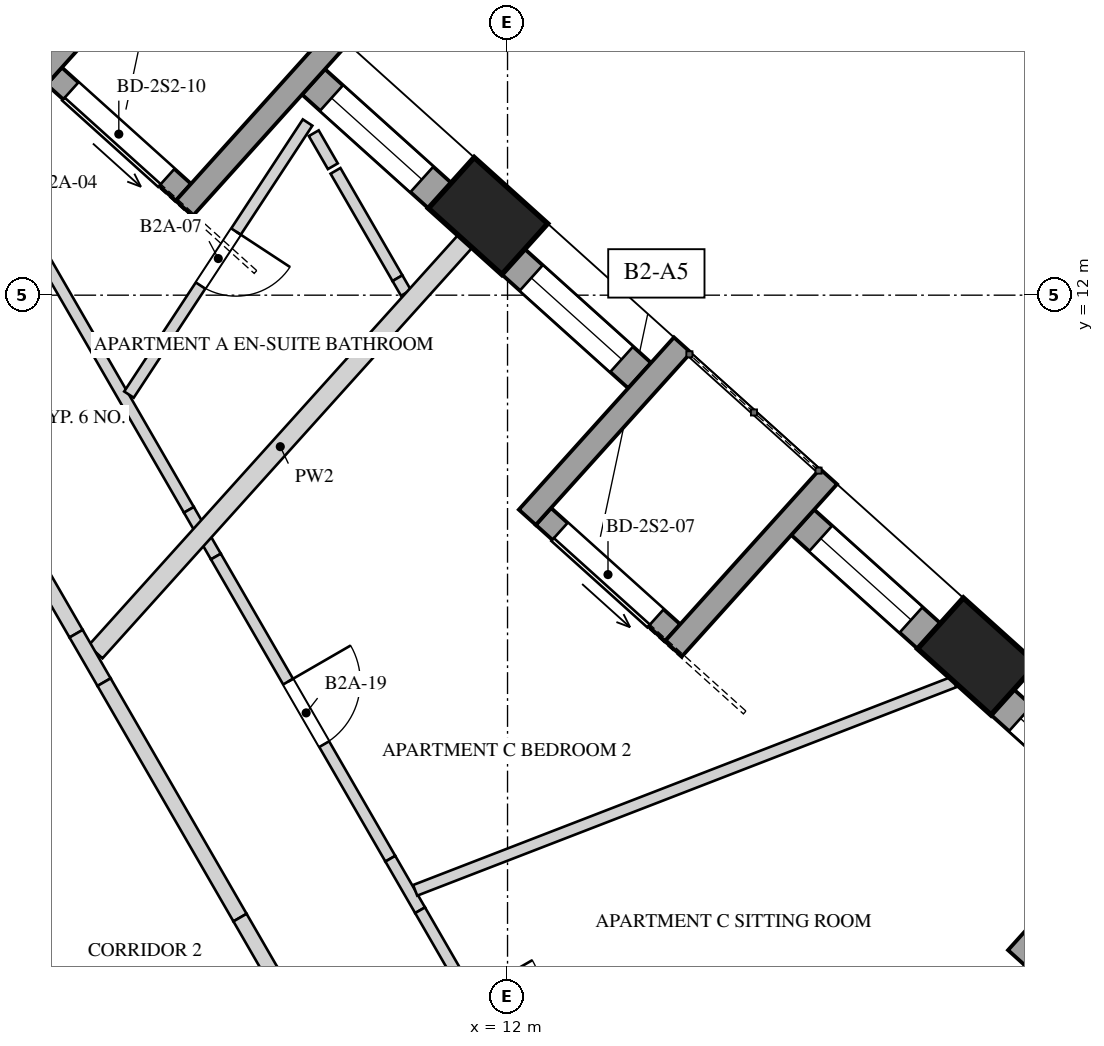
"""IFC4 building model, lengths in metres.
Left out: names, types, materials, properties, quantities, classifications, styles, units other than length and angle.
Written with IfcOpenShell. Run it as: python <this file> out.ifc"""

import sys

from ifc_helpers import new_model, si_unit, direction, frame, frame_2d, origin, origin_2d, place, context, subcontext, project, spatial, rectangle, extrude, element, fill, save


model = new_model("IFC4")
c1 = context("Model", 3, precision=1e-05, world=origin(), true_north=direction((0.0, 1.0)))
c2 = subcontext(c1, "Body", "Model", "MODEL_VIEW")
j1 = project(units=[si_unit("LENGTHUNIT", "METRE"), si_unit("PLANEANGLEUNIT", "RADIAN")], contexts=[c1])
p1 = place(None, origin())
s1 = spatial("IfcSite", under=j1, at=p1, CompositionType="ELEMENT")
p2 = place(p1, origin())
s2 = spatial("IfcBuilding", under=s1, at=p2, CompositionType="ELEMENT")
p3 = place(p2, frame((0.0, 0.0, 88.4)))
s3 = spatial("IfcBuildingStorey", under=s2, at=p3, CompositionType="ELEMENT", Elevation=88.4)
p4 = place(p3, frame((9.699, -4.25, 0.0), z_axis=(0.0, 0.0, 1.0), x_axis=(-0.499999102847, 0.866025921755, 0.0)))
e1 = element("IfcWall", 1, at=p4, inside=s3, PredefinedType="SHEAR", context=c2, shape_type="SweptSolid", body=[
    extrude(rectangle(XDim=17.061, YDim=0.95, at=frame_2d((8.53, 0.0))), origin(), (0.0, 0.0, 1.0), 4.0),
])
p5 = place(p4, frame((6.805, 0.0, 0.0)))
e2 = element("IfcOpeningElement", 2, at=p5, cuts=e1, PredefinedType="OPENING", context=c2, shape_type="SweptSolid", body=[
    extrude(rectangle(XDim=1.0, YDim=2.4, at=frame_2d((0.5, 1.2))), frame((0.0, 0.485, 0.0), z_axis=(0.0, -1.0, 0.0), x_axis=(1.0, 0.0, 0.0)), (0.0, 0.0, 1.0), 0.97),
])
for number, where, z_axis, x_axis in (
    (3, (18.179, 7.247, -0.35), (0.0, 0.0, 1.0), (-0.743, 0.669, 0.0)),
    (4, (11.743, 13.042, -0.35), (0.0, 0.0, 1.0), (-0.743, 0.669, 0.0)),
):
    element("IfcColumn", number, at=place(p3, frame(where, z_axis=z_axis, x_axis=x_axis)), inside=s3, PredefinedType="COLUMN", context=c2, shape_type="SweptSolid", body=[
        extrude(rectangle(XDim=1.3, YDim=0.9, at=origin_2d()), origin(), (0.0, 0.0, 1.0), 4.35),
    ])
p6 = place(p3, frame((20.174, 5.148, 0.0), z_axis=(0.0, 0.0, 1.0), x_axis=(-0.743136746477, 0.669139578889, 0.0)))
e5 = element("IfcWall", 5, at=p6, inside=s3, PredefinedType="SOLIDWALL", context=c2, shape_type="SweptSolid", body=[
    extrude(rectangle(XDim=2.237, YDim=0.45, at=frame_2d((1.119, 0.0))), origin(), (0.0, 0.0, 1.0), 3.3),
])
p7 = place(p6, frame((0.318, 0.0, 0.7)))
e6 = element("IfcOpeningElement", 6, at=p7, cuts=e5, PredefinedType="OPENING", context=c2, shape_type="SweptSolid", body=[
    extrude(rectangle(XDim=1.6, YDim=2.3, at=frame_2d((0.8, 1.15))), frame((0.0, 0.235, 0.0), z_axis=(0.0, -1.0, 0.0), x_axis=(1.0, 0.0, 0.0)), (0.0, 0.0, 1.0), 0.47),
])
p8 = place(p3, frame((17.545, 7.515, 0.0), z_axis=(0.0, 0.0, 1.0), x_axis=(-0.743142151309, 0.669133576311, 0.0)))
e7 = element("IfcWall", 7, at=p8, inside=s3, PredefinedType="SOLIDWALL", context=c2, shape_type="SweptSolid", body=[
    extrude(rectangle(XDim=2.237, YDim=0.45, at=frame_2d((1.118, 0.0))), origin(), (0.0, 0.0, 1.0), 3.3),
])
p9 = place(p8, frame((0.318, 0.0, 0.7)))
e8 = element("IfcOpeningElement", 8, at=p9, cuts=e7, PredefinedType="OPENING", context=c2, shape_type="SweptSolid", body=[
    extrude(rectangle(XDim=1.6, YDim=2.3, at=frame_2d((0.8, 1.15))), frame((0.0, 0.235, 0.0), z_axis=(0.0, -1.0, 0.0), x_axis=(1.0, 0.0, 0.0)), (0.0, 0.0, 1.0), 0.47),
])
p10 = place(p3, frame((13.738, 10.943, 0.0), z_axis=(0.0, 0.0, 1.0), x_axis=(-0.743191019375, 0.669079299276, 0.0)))
e9 = element("IfcWall", 9, at=p10, inside=s3, PredefinedType="SOLIDWALL", context=c2, shape_type="SweptSolid", body=[
    extrude(rectangle(XDim=2.237, YDim=0.45, at=frame_2d((1.118, 0.0))), origin(), (0.0, 0.0, 1.0), 3.3),
])
p11 = place(p10, frame((0.318, 0.0, 0.7)))
e10 = element("IfcOpeningElement", 10, at=p11, cuts=e9, PredefinedType="OPENING", context=c2, shape_type="SweptSolid", body=[
    extrude(rectangle(XDim=1.6, YDim=2.3, at=frame_2d((0.8, 1.15))), frame((0.0, 0.235, 0.0), z_axis=(0.0, -1.0, 0.0), x_axis=(1.0, 0.0, 0.0)), (0.0, 0.0, 1.0), 0.47),
])
p12 = place(p3, frame((11.11, 13.31, 0.0), z_axis=(0.0, 0.0, 1.0), x_axis=(-0.743087873176, 0.669193852885, 0.0)))
e11 = element("IfcWall", 11, at=p12, inside=s3, PredefinedType="SOLIDWALL", context=c2, shape_type="SweptSolid", body=[
    extrude(rectangle(XDim=2.237, YDim=0.45, at=frame_2d((1.118, 0.0))), origin(), (0.0, 0.0, 1.0), 3.3),
])
p13 = place(p12, frame((0.318, 0.0, 0.7)))
e12 = element("IfcOpeningElement", 12, at=p13, cuts=e11, PredefinedType="OPENING", context=c2, shape_type="SweptSolid", body=[
    extrude(rectangle(XDim=1.6, YDim=2.3, at=frame_2d((0.8, 1.15))), frame((0.0, 0.235, 0.0), z_axis=(0.0, -1.0, 0.0), x_axis=(1.0, 0.0, 0.0)), (0.0, 0.0, 1.0), 0.47),
])
p14 = place(p3, frame((20.607, 1.764, 0.0), z_axis=(0.0, 0.0, 1.0), x_axis=(-0.743182653308, 0.669088591909, 0.0)))
e13 = element("IfcWall", 13, at=p14, inside=s3, PredefinedType="SOLIDWALL", context=c2, shape_type="SweptSolid", body=[
    extrude(rectangle(XDim=2.287, YDim=0.3, at=frame_2d((1.143, 0.0))), origin(), (0.0, 0.0, 1.0), 3.3),
])
p15 = place(p14, frame((0.293, 0.0, 0.0)))
e14 = element("IfcOpeningElement", 14, at=p15, cuts=e13, PredefinedType="OPENING", context=c2, shape_type="SweptSolid", body=[
    extrude(rectangle(XDim=1.7, YDim=2.4, at=frame_2d((0.85, 1.2))), frame((0.0, 0.16, 0.0), z_axis=(0.0, -1.0, 0.0), x_axis=(1.0, 0.0, 0.0)), (0.0, 0.0, 1.0), 0.32),
])
p16 = place(p3, frame((20.737, 5.55, 0.0), z_axis=(0.0, 0.0, 1.0), x_axis=(-0.669115082961, -0.743158802514, 0.0)))
e15 = element("IfcWall", 15, at=p16, inside=s3, PredefinedType="SOLIDWALL", context=c2, shape_type="SweptSolid", body=[
    extrude(rectangle(XDim=3.05, YDim=0.3, at=frame_2d((1.525, 0.0))), origin(), (0.0, 0.0, 1.0), 3.3),
])
p17 = place(p3, frame((14.171, 7.559, 0.0), z_axis=(0.0, 0.0, 1.0), x_axis=(-0.743134851659, 0.66914168324, 0.0)))
e16 = element("IfcWall", 16, at=p17, inside=s3, PredefinedType="SOLIDWALL", context=c2, shape_type="SweptSolid", body=[
    extrude(rectangle(XDim=2.287, YDim=0.3, at=frame_2d((1.143, 0.0))), origin(), (0.0, 0.0, 1.0), 3.3),
])
p18 = place(p17, frame((0.293, 0.0, 0.0)))
e17 = element("IfcOpeningElement", 17, at=p18, cuts=e16, PredefinedType="OPENING", context=c2, shape_type="SweptSolid", body=[
    extrude(rectangle(XDim=1.7, YDim=2.4, at=frame_2d((0.85, 1.2))), frame((0.0, 0.16, 0.0), z_axis=(0.0, -1.0, 0.0), x_axis=(1.0, 0.0, 0.0)), (0.0, 0.0, 1.0), 0.32),
])
for number, where, z_axis, x_axis in (
    (18, (16.223, 9.614, 0.0), (0.0, 0.0, 1.0), (-0.669, -0.743, 0.0)),
    (19, (14.301, 11.345, 0.0), (0.0, 0.0, 1.0), (-0.669, -0.743, 0.0)),
):
    element("IfcWall", number, at=place(p3, frame(where, z_axis=z_axis, x_axis=x_axis)), inside=s3, PredefinedType="SOLIDWALL", context=c2, shape_type="SweptSolid", body=[
        extrude(rectangle(XDim=3.05, YDim=0.3, at=frame_2d((1.525, 0.0))), origin(), (0.0, 0.0, 1.0), 3.3),
    ])
p19 = place(p3, frame((7.736, 13.354, 0.0), z_axis=(0.0, 0.0, 1.0), x_axis=(-0.743081759278, 0.669200641832, 0.0)))
e20 = element("IfcWall", 20, at=p19, inside=s3, PredefinedType="SOLIDWALL", context=c2, shape_type="SweptSolid", body=[
    extrude(rectangle(XDim=2.287, YDim=0.3, at=frame_2d((1.143, 0.0))), origin(), (0.0, 0.0, 1.0), 3.3),
])
p20 = place(p19, frame((0.293, 0.0, 0.0)))
e21 = element("IfcOpeningElement", 21, at=p20, cuts=e20, PredefinedType="OPENING", context=c2, shape_type="SweptSolid", body=[
    extrude(rectangle(XDim=1.7, YDim=2.4, at=frame_2d((0.85, 1.2))), frame((0.0, 0.16, 0.0), z_axis=(0.0, -1.0, 0.0), x_axis=(1.0, 0.0, 0.0)), (0.0, 0.0, 1.0), 0.32),
])
for number, where, z_axis, x_axis in (
    (22, (9.788, 15.409, 0.0), (0.0, 0.0, 1.0), (-0.669, -0.743, 0.0)),
    (23, (7.865, 17.139, 0.0), (0.0, 0.0, 1.0), (-0.669, -0.743, 0.0)),
):
    element("IfcWall", number, at=place(p3, frame(where, z_axis=z_axis, x_axis=x_axis)), inside=s3, PredefinedType="SOLIDWALL", context=c2, shape_type="SweptSolid", body=[
        extrude(rectangle(XDim=3.05, YDim=0.3, at=frame_2d((1.525, 0.0))), origin(), (0.0, 0.0, 1.0), 3.3),
    ])
p21 = place(p3, frame((7.808, 9.176, 0.0), z_axis=(0.0, 0.0, 1.0), x_axis=(-0.499992467015, 0.866029752912, 0.0)))
e24 = element("IfcWall", 24, at=p21, inside=s3, PredefinedType="PARTITIONING", context=c2, shape_type="SweptSolid", body=[
    extrude(rectangle(XDim=6.548, YDim=0.15, at=frame_2d((3.274, 0.0))), origin(), (0.0, 0.0, 1.0), 3.65),
])
p22 = place(p21, frame((4.047, 0.0, 0.0)))
e25 = element("IfcOpeningElement", 25, at=p22, cuts=e24, PredefinedType="OPENING", context=c2, shape_type="SweptSolid", body=[
    extrude(rectangle(XDim=0.95, YDim=2.4, at=frame_2d((0.475, 1.2))), frame((0.0, 0.085, 0.0), z_axis=(0.0, -1.0, 0.0), x_axis=(1.0, 0.0, 0.0)), (0.0, 0.0, 1.0), 0.17),
])
p23 = place(p3, frame((7.808, 9.176, 0.0), z_axis=(0.0, 0.0, 1.0), x_axis=(0.499950805595, -0.866053804324, 0.0)))
e26 = element("IfcWall", 26, at=p23, inside=s3, PredefinedType="PARTITIONING", context=c2, shape_type="SweptSolid", body=[
    extrude(rectangle(XDim=0.709, YDim=0.15, at=frame_2d((0.355, 0.0))), origin(), (0.0, 0.0, 1.0), 2.95),
])
p24 = place(p3, frame((8.163, 8.562, 0.0), z_axis=(0.0, 0.0, 1.0), x_axis=(0.500023253097, -0.866011978186, 0.0)))
e27 = element("IfcWall", 27, at=p24, inside=s3, PredefinedType="PARTITIONING", context=c2, shape_type="SweptSolid", body=[
    extrude(rectangle(XDim=4.59, YDim=0.15, at=frame_2d((2.295, 0.0))), origin(), (0.0, 0.0, 1.0), 3.65),
])
p25 = place(p24, frame((1.9, 0.0, 0.0)))
e28 = element("IfcOpeningElement", 28, at=p25, cuts=e27, PredefinedType="OPENING", context=c2, shape_type="SweptSolid", body=[
    extrude(rectangle(XDim=0.95, YDim=2.4, at=frame_2d((0.475, 1.2))), frame((0.0, 0.085, 0.0), z_axis=(0.0, -1.0, 0.0), x_axis=(1.0, 0.0, 0.0)), (0.0, 0.0, 1.0), 0.17),
])
p26 = place(p3, frame((10.458, 4.586, 0.0), z_axis=(0.0, 0.0, 1.0), x_axis=(0.49979442921, -0.866144057608, 0.0)))
e29 = element("IfcWall", 29, at=p26, inside=s3, PredefinedType="PARTITIONING", context=c2, shape_type="SweptSolid", body=[
    extrude(rectangle(XDim=0.783, YDim=0.15, at=frame_2d((0.392, 0.0))), origin(), (0.0, 0.0, 1.0), 2.75),
])
p27 = place(p3, frame((10.849, 3.908, 0.0), z_axis=(0.0, 0.0, 1.0), x_axis=(0.500027861653, -0.866009317254, 0.0)))
e30 = element("IfcWall", 30, at=p27, inside=s3, PredefinedType="PARTITIONING", context=c2, shape_type="SweptSolid", body=[
    extrude(rectangle(XDim=3.16, YDim=0.15, at=frame_2d((1.58, 0.0))), origin(), (0.0, 0.0, 1.0), 3.65),
])
p28 = place(p27, frame((1.307, 0.0, 0.0)))
e31 = element("IfcOpeningElement", 31, at=p28, cuts=e30, PredefinedType="OPENING", context=c2, shape_type="SweptSolid", body=[
    extrude(rectangle(XDim=0.95, YDim=2.4, at=frame_2d((0.475, 1.2))), frame((0.0, 0.085, 0.0), z_axis=(0.0, -1.0, 0.0), x_axis=(1.0, 0.0, 0.0)), (0.0, 0.0, 1.0), 0.17),
])
p29 = place(p3, frame((9.37, 14.271, 0.0), z_axis=(0.0, 0.0, 1.0), x_axis=(-0.548818328071, -0.83594165034, 0.0)))
e32 = element("IfcWall", 32, at=p29, inside=s3, PredefinedType="PARTITIONING", context=c2, shape_type="SweptSolid", body=[
    extrude(rectangle(XDim=4.282, YDim=0.15, at=frame_2d((2.141, 0.0))), origin(), (0.0, 0.0, 1.0), 3.65),
])
p30 = place(p29, frame((1.716, 0.0, 0.0)))
e33 = element("IfcOpeningElement", 33, at=p30, cuts=e32, PredefinedType="OPENING", context=c2, shape_type="SweptSolid", body=[
    extrude(rectangle(XDim=0.85, YDim=2.4, at=frame_2d((0.425, 1.2))), frame((0.0, 0.085, 0.0), z_axis=(0.0, -1.0, 0.0), x_axis=(1.0, 0.0, 0.0)), (0.0, 0.0, 1.0), 0.17),
])
p31 = place(p3, frame((9.451, 14.131, 0.0), z_axis=(0.0, 0.0, 1.0), x_axis=(0.499904868165, -0.866080321209, 0.0)))
e34 = element("IfcWall", 34, at=p31, inside=s3, PredefinedType="PARTITIONING", context=c2, shape_type="SweptSolid", body=[
    extrude(rectangle(XDim=0.502, YDim=0.15, at=frame_2d((0.251, 0.0))), origin(), (0.0, 0.0, 1.0), 3.65),
])
p32 = place(p3, frame((9.737, 13.635, 0.0), z_axis=(0.0, 0.0, 1.0), x_axis=(0.499955758317, -0.866050945225, 0.0)))
e35 = element("IfcWall", 35, at=p32, inside=s3, PredefinedType="PARTITIONING", context=c2, shape_type="SweptSolid", body=[
    extrude(rectangle(XDim=1.631, YDim=0.15, at=frame_2d((0.815, 0.0))), origin(), (0.0, 0.0, 1.0), 3.65),
])
p33 = place(p3, frame((10.552, 12.223, 0.0), z_axis=(0.0, 0.0, 1.0), x_axis=(0.499785569122, -0.866149170119, 0.0)))
e36 = element("IfcWall", 36, at=p33, inside=s3, PredefinedType="PARTITIONING", context=c2, shape_type="SweptSolid", body=[
    extrude(rectangle(XDim=0.223, YDim=0.15, at=frame_2d((0.112, 0.0))), origin(), (0.0, 0.0, 1.0), 2.95),
])
p34 = place(p3, frame((10.785, 4.17, 0.0), z_axis=(0.0, 0.0, 1.0), x_axis=(0.932701213241, 0.360650033716, 0.0)))
e37 = element("IfcWall", 37, at=p34, inside=s3, PredefinedType="PARTITIONING", context=c2, shape_type="SweptSolid", body=[
    extrude(rectangle(XDim=7.605, YDim=0.15, at=frame_2d((3.802, 0.0))), origin(), (0.0, 0.0, 1.0), 2.75),
])
p35 = place(p3, frame((11.442, 12.708, 0.0), z_axis=(0.0, 0.0, 1.0), x_axis=(-0.66912430182, -0.743150502061, 0.0)))
e38 = element("IfcWall", 38, at=p35, inside=s3, PredefinedType="SOLIDWALL", context=c2, shape_type="SweptSolid", body=[
    extrude(rectangle(XDim=7.269, YDim=0.25, at=frame_2d((3.634, 0.0))), origin(), (0.0, 0.0, 1.0), 2.95),
])
p36 = place(p3, frame((3.747, 12.01, 0.0), z_axis=(0.0, 0.0, 1.0), x_axis=(0.500001317485, -0.866024643133, 0.0)))
e39 = element("IfcWall", 39, at=p36, inside=s3, PredefinedType="SOLIDWALL", context=c2, shape_type="SweptSolid", body=[
    extrude(rectangle(XDim=5.153, YDim=0.2, at=frame_2d((2.577, 0.0))), origin(), (0.0, 0.0, 1.0), 3.65),
])
p37 = place(p3, frame((6.324, 7.547, 0.0), z_axis=(0.0, 0.0, 1.0), x_axis=(0.499885169746, -0.866091690913, 0.0)))
e40 = element("IfcWall", 40, at=p37, inside=s3, PredefinedType="SOLIDWALL", context=c2, shape_type="SweptSolid", body=[
    extrude(rectangle(XDim=0.736, YDim=0.2, at=frame_2d((0.368, 0.0))), origin(), (0.0, 0.0, 1.0), 2.95),
])
p38 = place(p3, frame((6.692, 6.909, 0.0), z_axis=(0.0, 0.0, 1.0), x_axis=(0.500029679218, -0.866008267802, 0.0)))
e41 = element("IfcWall", 41, at=p38, inside=s3, PredefinedType="SOLIDWALL", context=c2, shape_type="SweptSolid", body=[
    extrude(rectangle(XDim=3.577, YDim=0.2, at=frame_2d((1.789, 0.0))), origin(), (0.0, 0.0, 1.0), 3.65),
])
p39 = place(p3, frame((8.48, 3.812, 0.0), z_axis=(0.0, 0.0, 1.0), x_axis=(0.499809598504, -0.866135304236, 0.0)))
e42 = element("IfcWall", 42, at=p39, inside=s3, PredefinedType="SOLIDWALL", context=c2, shape_type="SweptSolid", body=[
    extrude(rectangle(XDim=0.808, YDim=0.2, at=frame_2d((0.404, 0.0))), origin(), (0.0, 0.0, 1.0), 2.75),
])
p40 = place(p7, origin())
e43 = element("IfcWindow", 43, at=p40, inside=s3, PartitioningType="SINGLE_PANEL", PredefinedType="WINDOW", context=c2, shape_type="SweptSolid", body=[
    extrude(rectangle(XDim=1.6, YDim=2.3, at=frame_2d((0.8, 1.15))), frame((0.0, 0.03, 0.0), z_axis=(0.0, -1.0, 0.0), x_axis=(1.0, 0.0, 0.0)), (0.0, 0.0, 1.0), 0.06),
])
fill(e6, e43)
p41 = place(p9, origin())
e44 = element("IfcWindow", 44, at=p41, inside=s3, PartitioningType="SINGLE_PANEL", PredefinedType="WINDOW", context=c2, shape_type="SweptSolid", body=[
    extrude(rectangle(XDim=1.6, YDim=2.3, at=frame_2d((0.8, 1.15))), frame((0.0, 0.03, 0.0), z_axis=(0.0, -1.0, 0.0), x_axis=(1.0, 0.0, 0.0)), (0.0, 0.0, 1.0), 0.06),
])
fill(e8, e44)
p42 = place(p11, origin())
e45 = element("IfcWindow", 45, at=p42, inside=s3, PartitioningType="SINGLE_PANEL", PredefinedType="WINDOW", context=c2, shape_type="SweptSolid", body=[
    extrude(rectangle(XDim=1.6, YDim=2.3, at=frame_2d((0.8, 1.15))), frame((0.0, 0.03, 0.0), z_axis=(0.0, -1.0, 0.0), x_axis=(1.0, 0.0, 0.0)), (0.0, 0.0, 1.0), 0.06),
])
fill(e10, e45)
p43 = place(p13, origin())
e46 = element("IfcWindow", 46, at=p43, inside=s3, PartitioningType="SINGLE_PANEL", PredefinedType="WINDOW", context=c2, shape_type="SweptSolid", body=[
    extrude(rectangle(XDim=1.6, YDim=2.3, at=frame_2d((0.8, 1.15))), frame((0.0, 0.03, 0.0), z_axis=(0.0, -1.0, 0.0), x_axis=(1.0, 0.0, 0.0)), (0.0, 0.0, 1.0), 0.06),
])
fill(e12, e46)
p44 = place(p18, origin())
e47 = element("IfcDoor", 47, at=p44, inside=s3, OperationType="SLIDING_TO_LEFT", PredefinedType="DOOR", context=c2, shape_type="SweptSolid", body=[
    extrude(rectangle(XDim=1.7, YDim=2.4, at=frame_2d((0.85, 1.2))), frame((0.0, 0.025, 0.0), z_axis=(0.0, -1.0, 0.0), x_axis=(1.0, 0.0, 0.0)), (0.0, 0.0, 1.0), 0.05),
])
fill(e17, e47)
p45 = place(p20, origin())
e48 = element("IfcDoor", 48, at=p45, inside=s3, OperationType="SLIDING_TO_LEFT", PredefinedType="DOOR", context=c2, shape_type="SweptSolid", body=[
    extrude(rectangle(XDim=1.7, YDim=2.4, at=frame_2d((0.85, 1.2))), frame((0.0, 0.025, 0.0), z_axis=(0.0, -1.0, 0.0), x_axis=(1.0, 0.0, 0.0)), (0.0, 0.0, 1.0), 0.05),
])
fill(e21, e48)
p46 = place(p30, origin())
e49 = element("IfcDoor", 49, at=p46, inside=s3, OperationType="SINGLE_SWING_LEFT", PredefinedType="DOOR", context=c2, shape_type="SweptSolid", body=[
    extrude(rectangle(XDim=0.85, YDim=2.4, at=frame_2d((0.425, 1.2))), frame((0.0, 0.025, 0.0), z_axis=(0.0, -1.0, 0.0), x_axis=(1.0, 0.0, 0.0)), (0.0, 0.0, 1.0), 0.05),
])
fill(e33, e49)
p47 = place(p25, origin())
e50 = element("IfcDoor", 50, at=p47, inside=s3, OperationType="SINGLE_SWING_LEFT", PredefinedType="DOOR", context=c2, shape_type="SweptSolid", body=[
    extrude(rectangle(XDim=0.95, YDim=2.4, at=frame_2d((0.475, 1.2))), frame((0.0, 0.025, 0.0), z_axis=(0.0, -1.0, 0.0), x_axis=(1.0, 0.0, 0.0)), (0.0, 0.0, 1.0), 0.05),
])
fill(e28, e50)
save(model, sys.argv[1])
